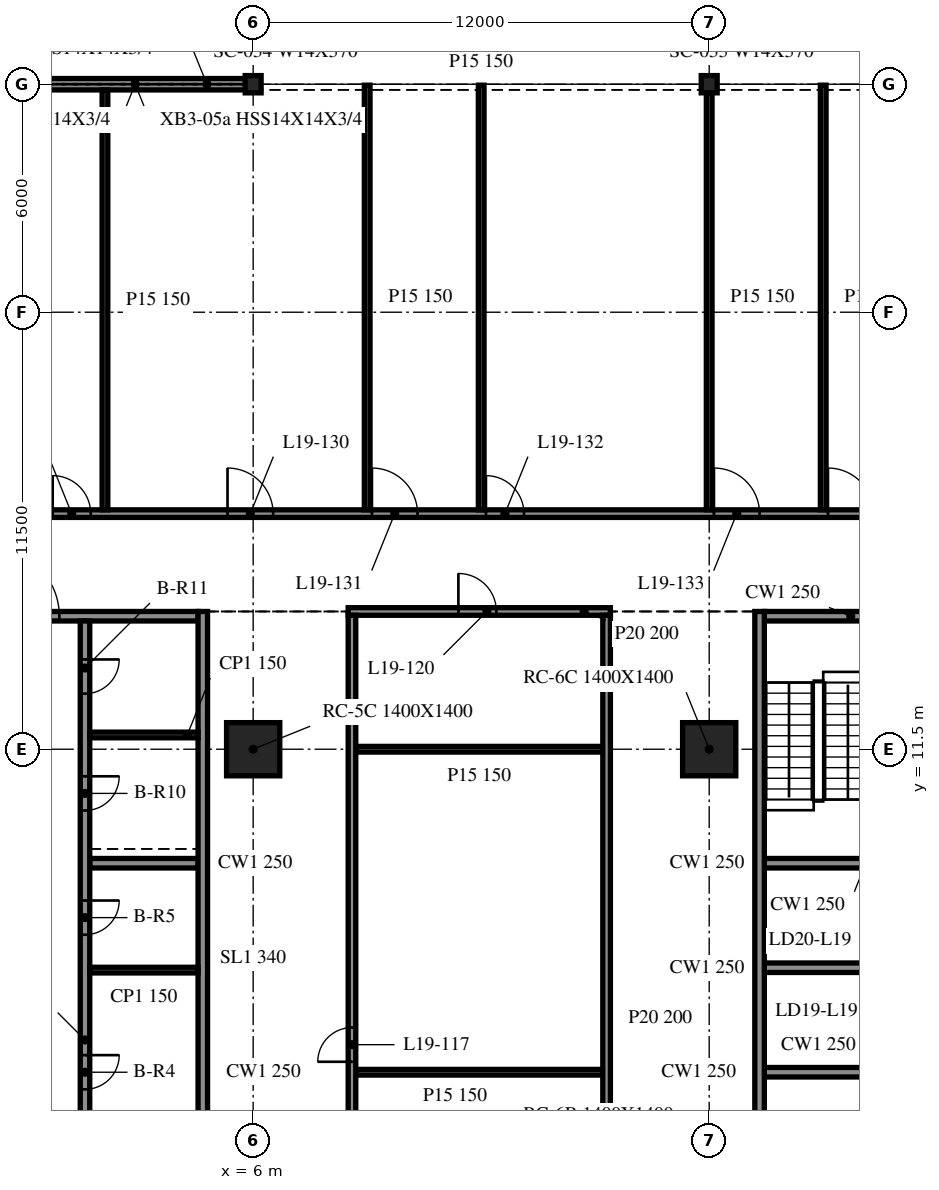
"""IFC4 building model, lengths in metres.
Left out: names, types, materials, properties, quantities, classifications, styles, units other than length and angle.
Written with IfcOpenShell. Run it as: python <this file> out.ifc"""

import sys

from ifc_helpers import new_model, si_unit, direction, frame, frame_2d, origin, origin_2d, place, context, subcontext, project, spatial, rectangle, i_section, extrude, element, fill, save


model = new_model("IFC4")
c1 = context("Model", 3, precision=1e-05, world=origin(), true_north=direction((0.0, 1.0)))
c2 = subcontext(c1, "Body", "Model", "MODEL_VIEW")
j1 = project(units=[si_unit("LENGTHUNIT", "METRE"), si_unit("PLANEANGLEUNIT", "RADIAN")], contexts=[c1])
p1 = place(None, origin())
s1 = spatial("IfcSite", under=j1, at=p1, CompositionType="ELEMENT")
p2 = place(p1, origin())
s2 = spatial("IfcBuilding", under=s1, at=p2, CompositionType="ELEMENT")
p3 = place(p2, frame((0.0, 0.0, 84.8)))
s3 = spatial("IfcBuildingStorey", under=s2, at=p3, CompositionType="ELEMENT", Elevation=84.8)
for number, where, z_axis, x_axis in (
    (1, (6.0, 11.5, -0.34), (0.0, 0.0, 1.0), (1.0, 0.0, 0.0)),
    (2, (18.0, 11.5, -0.34), (0.0, 0.0, 1.0), (1.0, 0.0, 0.0)),
):
    element("IfcColumn", number, at=place(p3, frame(where, z_axis=z_axis, x_axis=x_axis)), inside=s3, PredefinedType="COLUMN", context=c2, shape_type="SweptSolid", body=[
        extrude(rectangle(XDim=1.4, YDim=1.4, at=origin_2d()), origin(), (0.0, 0.0, 1.0), 4.1),
    ])
for number, where, z_axis, x_axis in (
    (3, (18.0, 29.0, -0.34), (0.0, 0.0, 1.0), (1.0, 0.0, 0.0)),
    (4, (6.0, 29.0, -0.34), (0.0, 0.0, 1.0), (1.0, 0.0, 0.0)),
):
    element("IfcColumn", number, at=place(p3, frame(where, z_axis=z_axis, x_axis=x_axis)), inside=s3, PredefinedType="COLUMN", context=c2, shape_type="SweptSolid", body=[
        extrude(i_section(OverallWidth=0.419, OverallDepth=0.455, WebThickness=0.042, FlangeThickness=0.068, at=origin_2d()), origin(), (0.0, 0.0, 1.0), 4.1),
    ])
p4 = place(p3, frame((5.979, 29.0, 0.0), z_axis=(0.0, 0.0, 1.0), x_axis=(-1.0, 0.0, 0.0)))
e5 = element("IfcWall", 5, at=p4, inside=s3, PredefinedType="NOTDEFINED", context=c2, shape_type="SweptSolid", body=[
    extrude(rectangle(XDim=11.958, YDim=0.3, at=frame_2d((5.979, 0.0))), origin(), (0.0, 0.0, 1.0), 3.003),
])
p5 = place(p3, frame((4.675, -9.125, 0.0), z_axis=(0.0, 0.0, 1.0), x_axis=(0.0, 1.0, 0.0)))
e6 = element("IfcWall", 6, at=p5, inside=s3, PredefinedType="SOLIDWALL", context=c2, shape_type="SweptSolid", body=[
    extrude(rectangle(XDim=24.25, YDim=0.25, at=frame_2d((12.125, 0.0))), origin(), (0.0, 0.0, 1.0), 3.76),
])
p6 = place(p3, frame((-4.55, 15.0, 0.0), z_axis=(0.0, 0.0, 1.0), x_axis=(1.0, 0.0, 0.0)))
e7 = element("IfcWall", 7, at=p6, inside=s3, PredefinedType="SOLIDWALL", context=c2, shape_type="SweptSolid", body=[
    extrude(rectangle(XDim=9.1, YDim=0.25, at=frame_2d((4.55, 0.0))), origin(), (0.0, 0.0, 1.0), 3.76),
])
p7 = place(p6, frame((3.65, 0.0, 0.0)))
e8 = element("IfcOpeningElement", 8, at=p7, cuts=e7, PredefinedType="OPENING", context=c2, shape_type="SweptSolid", body=[
    extrude(rectangle(XDim=1.8, YDim=2.1, at=frame_2d((0.9, 1.05))), frame((0.0, 0.135, 0.0), z_axis=(0.0, -1.0, 0.0), x_axis=(1.0, 0.0, 0.0)), (0.0, 0.0, 1.0), 0.27),
])
p8 = place(p3, frame((1.575, 14.875, 0.0), z_axis=(0.0, 0.0, 1.0), x_axis=(0.0, -1.0, 0.0)))
e9 = element("IfcWall", 9, at=p8, inside=s3, PredefinedType="SOLIDWALL", context=c2, shape_type="SweptSolid", body=[
    extrude(rectangle(XDim=17.5, YDim=0.25, at=frame_2d((8.75, 0.0))), origin(), (0.0, 0.0, 1.0), 3.76),
])
p9 = place(p8, frame((15.494, 0.0, 0.0)))
e10 = element("IfcOpeningElement", 10, at=p9, cuts=e9, PredefinedType="OPENING", context=c2, shape_type="SweptSolid", body=[
    extrude(rectangle(XDim=0.9, YDim=2.1, at=frame_2d((0.45, 1.05))), frame((0.0, 0.135, 0.0), z_axis=(0.0, -1.0, 0.0), x_axis=(1.0, 0.0, 0.0)), (0.0, 0.0, 1.0), 0.27),
])
p10 = place(p8, frame((11.425, 0.0, 0.0)))
e11 = element("IfcOpeningElement", 11, at=p10, cuts=e9, PredefinedType="OPENING", context=c2, shape_type="SweptSolid", body=[
    extrude(rectangle(XDim=0.9, YDim=2.1, at=frame_2d((0.45, 1.05))), frame((0.0, 0.135, 0.0), z_axis=(0.0, -1.0, 0.0), x_axis=(1.0, 0.0, 0.0)), (0.0, 0.0, 1.0), 0.27),
])
p11 = place(p8, frame((7.356, 0.0, 0.0)))
e12 = element("IfcOpeningElement", 12, at=p11, cuts=e9, PredefinedType="OPENING", context=c2, shape_type="SweptSolid", body=[
    extrude(rectangle(XDim=0.9, YDim=2.1, at=frame_2d((0.45, 1.05))), frame((0.0, 0.135, 0.0), z_axis=(0.0, -1.0, 0.0), x_axis=(1.0, 0.0, 0.0)), (0.0, 0.0, 1.0), 0.27),
])
p12 = place(p8, frame((4.087, 0.0, 0.0)))
e13 = element("IfcOpeningElement", 13, at=p12, cuts=e9, PredefinedType="OPENING", context=c2, shape_type="SweptSolid", body=[
    extrude(rectangle(XDim=0.9, YDim=2.1, at=frame_2d((0.45, 1.05))), frame((0.0, 0.135, 0.0), z_axis=(0.0, -1.0, 0.0), x_axis=(1.0, 0.0, 0.0)), (0.0, 0.0, 1.0), 0.27),
])
p13 = place(p8, frame((1.012, 0.0, 0.0)))
e14 = element("IfcOpeningElement", 14, at=p13, cuts=e9, PredefinedType="OPENING", context=c2, shape_type="SweptSolid", body=[
    extrude(rectangle(XDim=0.9, YDim=2.1, at=frame_2d((0.45, 1.05))), frame((0.0, 0.135, 0.0), z_axis=(0.0, -1.0, 0.0), x_axis=(1.0, 0.0, 0.0)), (0.0, 0.0, 1.0), 0.27),
])
p14 = place(p3, frame((1.7, 8.5, 0.0), z_axis=(0.0, 0.0, 1.0), x_axis=(1.0, 0.0, 0.0)))
e15 = element("IfcWall", 15, at=p14, inside=s3, PredefinedType="SOLIDWALL", context=c2, shape_type="SweptSolid", body=[
    extrude(rectangle(XDim=2.85, YDim=0.25, at=frame_2d((1.425, 0.0))), origin(), (0.0, 0.0, 1.0), 3.76),
])
for number, where, z_axis, x_axis in (
    (16, (1.7, 5.688, 0.0), (0.0, 0.0, 1.0), (1.0, 0.0, 0.0)),
    (17, (1.7, 11.875, 0.0), (0.0, 0.0, 1.0), (1.0, 0.0, 0.0)),
):
    element("IfcWall", number, at=place(p3, frame(where, z_axis=z_axis, x_axis=x_axis)), inside=s3, PredefinedType="PARTITIONING", context=c2, shape_type="SweptSolid", body=[
        extrude(rectangle(XDim=2.85, YDim=0.15, at=frame_2d((1.425, 0.0))), origin(), (0.0, 0.0, 1.0), 3.76),
    ])
p15 = place(p3, frame((19.325, 15.125, 0.0), z_axis=(0.0, 0.0, 1.0), x_axis=(0.0, -1.0, 0.0)))
e18 = element("IfcWall", 18, at=p15, inside=s3, PredefinedType="SOLIDWALL", context=c2, shape_type="SweptSolid", body=[
    extrude(rectangle(XDim=24.25, YDim=0.25, at=frame_2d((12.125, 0.0))), origin(), (0.0, 0.0, 1.0), 3.76),
])
p16 = place(p3, frame((19.45, 15.0, 0.0), z_axis=(0.0, 0.0, 1.0), x_axis=(1.0, 0.0, 0.0)))
e19 = element("IfcWall", 19, at=p16, inside=s3, PredefinedType="SOLIDWALL", context=c2, shape_type="SweptSolid", body=[
    extrude(rectangle(XDim=9.1, YDim=0.25, at=frame_2d((4.55, 0.0))), origin(), (0.0, 0.0, 1.0), 3.76),
])
p17 = place(p16, frame((3.65, 0.0, 0.0)))
e20 = element("IfcOpeningElement", 20, at=p17, cuts=e19, PredefinedType="OPENING", context=c2, shape_type="SweptSolid", body=[
    extrude(rectangle(XDim=1.8, YDim=2.1, at=frame_2d((0.9, 1.05))), frame((0.0, 0.135, 0.0), z_axis=(0.0, -1.0, 0.0), x_axis=(1.0, 0.0, 0.0)), (0.0, 0.0, 1.0), 0.27),
])
for number, where, z_axis, x_axis in (
    (21, (19.45, 3.0, 0.0), (0.0, 0.0, 1.0), (1.0, 0.0, 0.0)),
    (22, (19.45, 5.75, 0.0), (0.0, 0.0, 1.0), (1.0, 0.0, 0.0)),
    (23, (19.45, 8.5, 0.0), (0.0, 0.0, 1.0), (1.0, 0.0, 0.0)),
):
    element("IfcWall", number, at=place(p3, frame(where, z_axis=z_axis, x_axis=x_axis)), inside=s3, PredefinedType="SOLIDWALL", context=c2, shape_type="SweptSolid", body=[
        extrude(rectangle(XDim=2.85, YDim=0.25, at=frame_2d((1.425, 0.0))), origin(), (0.0, 0.0, 1.0), 3.76),
    ])
for number, where, z_axis, x_axis in (
    (24, (8.7, 3.0, 0.0), (0.0, 0.0, 1.0), (1.0, 0.0, 0.0)),
    (25, (8.7, 11.5, 0.0), (0.0, 0.0, 1.0), (1.0, 0.0, 0.0)),
):
    element("IfcWall", number, at=place(p3, frame(where, z_axis=z_axis, x_axis=x_axis)), inside=s3, PredefinedType="PARTITIONING", context=c2, shape_type="SweptSolid", body=[
        extrude(rectangle(XDim=6.5, YDim=0.15, at=frame_2d((3.25, 0.0))), origin(), (0.0, 0.0, 1.0), 3.76),
    ])
p18 = place(p3, frame((8.5, 15.125, 0.0), z_axis=(0.0, 0.0, 1.0), x_axis=(1.0, 0.0, 0.0)))
e26 = element("IfcWall", 26, at=p18, inside=s3, PredefinedType="PARTITIONING", context=c2, shape_type="SweptSolid", body=[
    extrude(rectangle(XDim=6.9, YDim=0.2, at=frame_2d((3.45, 0.0))), origin(), (0.0, 0.0, 1.0), 3.76),
])
p19 = place(p18, frame((2.9, 0.0, 0.0)))
e27 = element("IfcOpeningElement", 27, at=p19, cuts=e26, PredefinedType="OPENING", context=c2, shape_type="SweptSolid", body=[
    extrude(rectangle(XDim=1.0, YDim=2.1, at=frame_2d((0.5, 1.05))), frame((0.0, 0.11, 0.0), z_axis=(0.0, -1.0, 0.0), x_axis=(1.0, 0.0, 0.0)), (0.0, 0.0, 1.0), 0.22),
])
p20 = place(p3, frame((-41.975, 17.7, 0.0), z_axis=(0.0, 0.0, 1.0), x_axis=(1.0, 0.0, 0.0)))
e28 = element("IfcWall", 28, at=p20, inside=s3, PredefinedType="PARTITIONING", context=c2, shape_type="SweptSolid", body=[
    extrude(rectangle(XDim=95.95, YDim=0.2, at=frame_2d((47.975, 0.0))), origin(), (0.0, 0.0, 1.0), 3.76),
])
p21 = place(p20, frame((4.5, 0.0, 0.0)))
e29 = element("IfcOpeningElement", 29, at=p21, cuts=e28, PredefinedType="OPENING", context=c2, shape_type="SweptSolid", body=[
    extrude(rectangle(XDim=1.0, YDim=2.1, at=frame_2d((0.5, 1.05))), frame((0.0, 0.11, 0.0), z_axis=(0.0, -1.0, 0.0), x_axis=(1.0, 0.0, 0.0)), (0.0, 0.0, 1.0), 0.22),
])
p22 = place(p20, frame((13.3, 0.0, 0.0)))
e30 = element("IfcOpeningElement", 30, at=p22, cuts=e28, PredefinedType="OPENING", context=c2, shape_type="SweptSolid", body=[
    extrude(rectangle(XDim=1.2, YDim=2.1, at=frame_2d((0.6, 1.05))), frame((0.0, 0.11, 0.0), z_axis=(0.0, -1.0, 0.0), x_axis=(1.0, 0.0, 0.0)), (0.0, 0.0, 1.0), 0.22),
])
p23 = place(p20, frame((16.3, 0.0, 0.0)))
e31 = element("IfcOpeningElement", 31, at=p23, cuts=e28, PredefinedType="OPENING", context=c2, shape_type="SweptSolid", body=[
    extrude(rectangle(XDim=1.2, YDim=2.1, at=frame_2d((0.6, 1.05))), frame((0.0, 0.11, 0.0), z_axis=(0.0, -1.0, 0.0), x_axis=(1.0, 0.0, 0.0)), (0.0, 0.0, 1.0), 0.22),
])
p24 = place(p20, frame((22.5, 0.0, 0.0)))
e32 = element("IfcOpeningElement", 32, at=p24, cuts=e28, PredefinedType="OPENING", context=c2, shape_type="SweptSolid", body=[
    extrude(rectangle(XDim=1.0, YDim=2.1, at=frame_2d((0.5, 1.05))), frame((0.0, 0.11, 0.0), z_axis=(0.0, -1.0, 0.0), x_axis=(1.0, 0.0, 0.0)), (0.0, 0.0, 1.0), 0.22),
])
p25 = place(p20, frame((25.3, 0.0, 0.0)))
e33 = element("IfcOpeningElement", 33, at=p25, cuts=e28, PredefinedType="OPENING", context=c2, shape_type="SweptSolid", body=[
    extrude(rectangle(XDim=1.2, YDim=2.1, at=frame_2d((0.6, 1.05))), frame((0.0, 0.11, 0.0), z_axis=(0.0, -1.0, 0.0), x_axis=(1.0, 0.0, 0.0)), (0.0, 0.0, 1.0), 0.22),
])
p26 = place(p20, frame((34.3, 0.0, 0.0)))
e34 = element("IfcOpeningElement", 34, at=p26, cuts=e28, PredefinedType="OPENING", context=c2, shape_type="SweptSolid", body=[
    extrude(rectangle(XDim=1.2, YDim=2.1, at=frame_2d((0.6, 1.05))), frame((0.0, 0.11, 0.0), z_axis=(0.0, -1.0, 0.0), x_axis=(1.0, 0.0, 0.0)), (0.0, 0.0, 1.0), 0.22),
])
p27 = place(p20, frame((42.7, 0.0, 0.0)))
e35 = element("IfcOpeningElement", 35, at=p27, cuts=e28, PredefinedType="OPENING", context=c2, shape_type="SweptSolid", body=[
    extrude(rectangle(XDim=1.0, YDim=2.1, at=frame_2d((0.5, 1.05))), frame((0.0, 0.11, 0.0), z_axis=(0.0, -1.0, 0.0), x_axis=(1.0, 0.0, 0.0)), (0.0, 0.0, 1.0), 0.22),
])
p28 = place(p20, frame((47.3, 0.0, 0.0)))
e36 = element("IfcOpeningElement", 36, at=p28, cuts=e28, PredefinedType="OPENING", context=c2, shape_type="SweptSolid", body=[
    extrude(rectangle(XDim=1.2, YDim=2.1, at=frame_2d((0.6, 1.05))), frame((0.0, 0.11, 0.0), z_axis=(0.0, -1.0, 0.0), x_axis=(1.0, 0.0, 0.0)), (0.0, 0.0, 1.0), 0.22),
])
p29 = place(p20, frame((51.1, 0.0, 0.0)))
e37 = element("IfcOpeningElement", 37, at=p29, cuts=e28, PredefinedType="OPENING", context=c2, shape_type="SweptSolid", body=[
    extrude(rectangle(XDim=1.2, YDim=2.1, at=frame_2d((0.6, 1.05))), frame((0.0, 0.11, 0.0), z_axis=(0.0, -1.0, 0.0), x_axis=(1.0, 0.0, 0.0)), (0.0, 0.0, 1.0), 0.22),
])
p30 = place(p20, frame((54.1, 0.0, 0.0)))
e38 = element("IfcOpeningElement", 38, at=p30, cuts=e28, PredefinedType="OPENING", context=c2, shape_type="SweptSolid", body=[
    extrude(rectangle(XDim=1.0, YDim=2.1, at=frame_2d((0.5, 1.05))), frame((0.0, 0.11, 0.0), z_axis=(0.0, -1.0, 0.0), x_axis=(1.0, 0.0, 0.0)), (0.0, 0.0, 1.0), 0.22),
])
p31 = place(p20, frame((60.1, 0.0, 0.0)))
e39 = element("IfcOpeningElement", 39, at=p31, cuts=e28, PredefinedType="OPENING", context=c2, shape_type="SweptSolid", body=[
    extrude(rectangle(XDim=1.2, YDim=2.1, at=frame_2d((0.6, 1.05))), frame((0.0, 0.11, 0.0), z_axis=(0.0, -1.0, 0.0), x_axis=(1.0, 0.0, 0.0)), (0.0, 0.0, 1.0), 0.22),
])
p32 = place(p20, frame((63.1, 0.0, 0.0)))
e40 = element("IfcOpeningElement", 40, at=p32, cuts=e28, PredefinedType="OPENING", context=c2, shape_type="SweptSolid", body=[
    extrude(rectangle(XDim=1.2, YDim=2.1, at=frame_2d((0.6, 1.05))), frame((0.0, 0.11, 0.0), z_axis=(0.0, -1.0, 0.0), x_axis=(1.0, 0.0, 0.0)), (0.0, 0.0, 1.0), 0.22),
])
p33 = place(p20, frame((72.1, 0.0, 0.0)))
e41 = element("IfcOpeningElement", 41, at=p33, cuts=e28, PredefinedType="OPENING", context=c2, shape_type="SweptSolid", body=[
    extrude(rectangle(XDim=1.0, YDim=2.1, at=frame_2d((0.5, 1.05))), frame((0.0, 0.11, 0.0), z_axis=(0.0, -1.0, 0.0), x_axis=(1.0, 0.0, 0.0)), (0.0, 0.0, 1.0), 0.22),
])
p34 = place(p20, frame((78.1, 0.0, 0.0)))
e42 = element("IfcOpeningElement", 42, at=p34, cuts=e28, PredefinedType="OPENING", context=c2, shape_type="SweptSolid", body=[
    extrude(rectangle(XDim=1.2, YDim=2.1, at=frame_2d((0.6, 1.05))), frame((0.0, 0.11, 0.0), z_axis=(0.0, -1.0, 0.0), x_axis=(1.0, 0.0, 0.0)), (0.0, 0.0, 1.0), 0.22),
])
p35 = place(p20, frame((87.1, 0.0, 0.0)))
e43 = element("IfcOpeningElement", 43, at=p35, cuts=e28, PredefinedType="OPENING", context=c2, shape_type="SweptSolid", body=[
    extrude(rectangle(XDim=1.2, YDim=2.1, at=frame_2d((0.6, 1.05))), frame((0.0, 0.11, 0.0), z_axis=(0.0, -1.0, 0.0), x_axis=(1.0, 0.0, 0.0)), (0.0, 0.0, 1.0), 0.22),
])
p36 = place(p20, frame((90.1, 0.0, 0.0)))
e44 = element("IfcOpeningElement", 44, at=p36, cuts=e28, PredefinedType="OPENING", context=c2, shape_type="SweptSolid", body=[
    extrude(rectangle(XDim=1.0, YDim=2.1, at=frame_2d((0.5, 1.05))), frame((0.0, 0.11, 0.0), z_axis=(0.0, -1.0, 0.0), x_axis=(1.0, 0.0, 0.0)), (0.0, 0.0, 1.0), 0.22),
])
p37 = place(p3, frame((2.1, 17.8, 0.0), z_axis=(0.0, 0.0, 1.0), x_axis=(0.0, 1.0, 0.0)))
e45 = element("IfcWall", 45, at=p37, inside=s3, PredefinedType="PARTITIONING", context=c2, shape_type="SweptSolid", body=[
    extrude(rectangle(XDim=11.05, YDim=0.15, at=frame_2d((5.525, 0.0))), origin(), (0.0, 0.0, 1.0), 3.76),
])
p38 = place(p3, frame((8.6, -9.025, 0.0), z_axis=(0.0, 0.0, 1.0), x_axis=(0.0, 1.0, 0.0)))
e46 = element("IfcWall", 46, at=p38, inside=s3, PredefinedType="PARTITIONING", context=c2, shape_type="SweptSolid", body=[
    extrude(rectangle(XDim=24.05, YDim=0.2, at=frame_2d((12.025, 0.0))), origin(), (0.0, 0.0, 1.0), 3.76),
])
p39 = place(p38, frame((12.3, 0.0, 0.0)))
e47 = element("IfcOpeningElement", 47, at=p39, cuts=e46, PredefinedType="OPENING", context=c2, shape_type="SweptSolid", body=[
    extrude(rectangle(XDim=0.9, YDim=2.1, at=frame_2d((0.45, 1.05))), frame((0.0, 0.11, 0.0), z_axis=(0.0, -1.0, 0.0), x_axis=(1.0, 0.0, 0.0)), (0.0, 0.0, 1.0), 0.22),
])
for number, where, z_axis, x_axis in (
    (48, (9.0, 17.8, 0.0), (0.0, 0.0, 1.0), (0.0, 1.0, 0.0)),
    (49, (12.0, 17.8, 0.0), (0.0, 0.0, 1.0), (0.0, 1.0, 0.0)),
):
    element("IfcWall", number, at=place(p3, frame(where, z_axis=z_axis, x_axis=x_axis)), inside=s3, PredefinedType="PARTITIONING", context=c2, shape_type="SweptSolid", body=[
        extrude(rectangle(XDim=11.175, YDim=0.15, at=frame_2d((5.587, 0.0))), origin(), (0.0, 0.0, 1.0), 3.76),
    ])
p40 = place(p3, frame((15.3, -9.025, 0.0), z_axis=(0.0, 0.0, 1.0), x_axis=(0.0, 1.0, 0.0)))
e50 = element("IfcWall", 50, at=p40, inside=s3, PredefinedType="PARTITIONING", context=c2, shape_type="SweptSolid", body=[
    extrude(rectangle(XDim=24.05, YDim=0.2, at=frame_2d((12.025, 0.0))), origin(), (0.0, 0.0, 1.0), 3.76),
])
for number, where, z_axis, x_axis in (
    (51, (18.0, 17.8, 0.0), (0.0, 0.0, 1.0), (0.0, 1.0, 0.0)),
    (52, (21.0, 17.8, 0.0), (0.0, 0.0, 1.0), (0.0, 1.0, 0.0)),
):
    element("IfcWall", number, at=place(p3, frame(where, z_axis=z_axis, x_axis=x_axis)), inside=s3, PredefinedType="PARTITIONING", context=c2, shape_type="SweptSolid", body=[
        extrude(rectangle(XDim=11.175, YDim=0.15, at=frame_2d((5.587, 0.0))), origin(), (0.0, 0.0, 1.0), 3.76),
    ])
p41 = place(p7, origin())
e53 = element("IfcDoor", 53, at=p41, inside=s3, OperationType="DOUBLE_DOOR_SINGLE_SWING", PredefinedType="DOOR", context=c2, shape_type="SweptSolid", body=[
    extrude(rectangle(XDim=1.8, YDim=2.1, at=frame_2d((0.9, 1.05))), frame((0.0, 0.025, 0.0), z_axis=(0.0, -1.0, 0.0), x_axis=(1.0, 0.0, 0.0)), (0.0, 0.0, 1.0), 0.05),
])
fill(e8, e53)
p42 = place(p10, origin())
e54 = element("IfcDoor", 54, at=p42, inside=s3, OperationType="SINGLE_SWING_RIGHT", PredefinedType="DOOR", context=c2, shape_type="SweptSolid", body=[
    extrude(rectangle(XDim=0.9, YDim=2.1, at=frame_2d((0.45, 1.05))), frame((0.0, 0.025, 0.0), z_axis=(0.0, -1.0, 0.0), x_axis=(1.0, 0.0, 0.0)), (0.0, 0.0, 1.0), 0.05),
])
fill(e11, e54)
p43 = place(p11, origin())
e55 = element("IfcDoor", 55, at=p43, inside=s3, OperationType="SINGLE_SWING_LEFT", PredefinedType="DOOR", context=c2, shape_type="SweptSolid", body=[
    extrude(rectangle(XDim=0.9, YDim=2.1, at=frame_2d((0.45, 1.05))), frame((0.0, 0.025, 0.0), z_axis=(0.0, -1.0, 0.0), x_axis=(1.0, 0.0, 0.0)), (0.0, 0.0, 1.0), 0.05),
])
fill(e12, e55)
p44 = place(p12, origin())
e56 = element("IfcDoor", 56, at=p44, inside=s3, OperationType="SINGLE_SWING_RIGHT", PredefinedType="DOOR", context=c2, shape_type="SweptSolid", body=[
    extrude(rectangle(XDim=0.9, YDim=2.1, at=frame_2d((0.45, 1.05))), frame((0.0, 0.025, 0.0), z_axis=(0.0, -1.0, 0.0), x_axis=(1.0, 0.0, 0.0)), (0.0, 0.0, 1.0), 0.05),
])
fill(e13, e56)
p45 = place(p13, origin())
e57 = element("IfcDoor", 57, at=p45, inside=s3, OperationType="SINGLE_SWING_LEFT", PredefinedType="DOOR", context=c2, shape_type="SweptSolid", body=[
    extrude(rectangle(XDim=0.9, YDim=2.1, at=frame_2d((0.45, 1.05))), frame((0.0, 0.025, 0.0), z_axis=(0.0, -1.0, 0.0), x_axis=(1.0, 0.0, 0.0)), (0.0, 0.0, 1.0), 0.05),
])
fill(e14, e57)
p46 = place(p39, origin())
e58 = element("IfcDoor", 58, at=p46, inside=s3, OperationType="SINGLE_SWING_LEFT", PredefinedType="DOOR", context=c2, shape_type="SweptSolid", body=[
    extrude(rectangle(XDim=0.9, YDim=2.1, at=frame_2d((0.45, 1.05))), frame((0.0, 0.025, 0.0), z_axis=(0.0, -1.0, 0.0), x_axis=(1.0, 0.0, 0.0)), (0.0, 0.0, 1.0), 0.05),
])
fill(e47, e58)
p47 = place(p19, origin())
e59 = element("IfcDoor", 59, at=p47, inside=s3, OperationType="SINGLE_SWING_RIGHT", PredefinedType="DOOR", context=c2, shape_type="SweptSolid", body=[
    extrude(rectangle(XDim=1.0, YDim=2.1, at=frame_2d((0.5, 1.05))), frame((0.0, 0.025, 0.0), z_axis=(0.0, -1.0, 0.0), x_axis=(1.0, 0.0, 0.0)), (0.0, 0.0, 1.0), 0.05),
])
fill(e27, e59)
p48 = place(p27, origin())
e60 = element("IfcDoor", 60, at=p48, inside=s3, OperationType="SINGLE_SWING_LEFT", PredefinedType="DOOR", context=c2, shape_type="SweptSolid", body=[
    extrude(rectangle(XDim=1.0, YDim=2.1, at=frame_2d((0.5, 1.05))), frame((0.0, 0.025, 0.0), z_axis=(0.0, -1.0, 0.0), x_axis=(1.0, 0.0, 0.0)), (0.0, 0.0, 1.0), 0.05),
])
fill(e35, e60)
p49 = place(p28, origin())
e61 = element("IfcDoor", 61, at=p49, inside=s3, OperationType="SINGLE_SWING_RIGHT", PredefinedType="DOOR", context=c2, shape_type="SweptSolid", body=[
    extrude(rectangle(XDim=1.2, YDim=2.1, at=frame_2d((0.6, 1.05))), frame((0.0, 0.025, 0.0), z_axis=(0.0, -1.0, 0.0), x_axis=(1.0, 0.0, 0.0)), (0.0, 0.0, 1.0), 0.05),
])
fill(e36, e61)
p50 = place(p29, origin())
e62 = element("IfcDoor", 62, at=p50, inside=s3, OperationType="SINGLE_SWING_RIGHT", PredefinedType="DOOR", context=c2, shape_type="SweptSolid", body=[
    extrude(rectangle(XDim=1.2, YDim=2.1, at=frame_2d((0.6, 1.05))), frame((0.0, 0.025, 0.0), z_axis=(0.0, -1.0, 0.0), x_axis=(1.0, 0.0, 0.0)), (0.0, 0.0, 1.0), 0.05),
])
fill(e37, e62)
p51 = place(p30, origin())
e63 = element("IfcDoor", 63, at=p51, inside=s3, OperationType="SINGLE_SWING_RIGHT", PredefinedType="DOOR", context=c2, shape_type="SweptSolid", body=[
    extrude(rectangle(XDim=1.0, YDim=2.1, at=frame_2d((0.5, 1.05))), frame((0.0, 0.025, 0.0), z_axis=(0.0, -1.0, 0.0), x_axis=(1.0, 0.0, 0.0)), (0.0, 0.0, 1.0), 0.05),
])
fill(e38, e63)
p52 = place(p31, origin())
e64 = element("IfcDoor", 64, at=p52, inside=s3, OperationType="SINGLE_SWING_RIGHT", PredefinedType="DOOR", context=c2, shape_type="SweptSolid", body=[
    extrude(rectangle(XDim=1.2, YDim=2.1, at=frame_2d((0.6, 1.05))), frame((0.0, 0.025, 0.0), z_axis=(0.0, -1.0, 0.0), x_axis=(1.0, 0.0, 0.0)), (0.0, 0.0, 1.0), 0.05),
])
fill(e39, e64)
p53 = place(p32, origin())
e65 = element("IfcDoor", 65, at=p53, inside=s3, OperationType="SINGLE_SWING_RIGHT", PredefinedType="DOOR", context=c2, shape_type="SweptSolid", body=[
    extrude(rectangle(XDim=1.2, YDim=2.1, at=frame_2d((0.6, 1.05))), frame((0.0, 0.025, 0.0), z_axis=(0.0, -1.0, 0.0), x_axis=(1.0, 0.0, 0.0)), (0.0, 0.0, 1.0), 0.05),
])
fill(e40, e65)
save(model, sys.argv[1])
